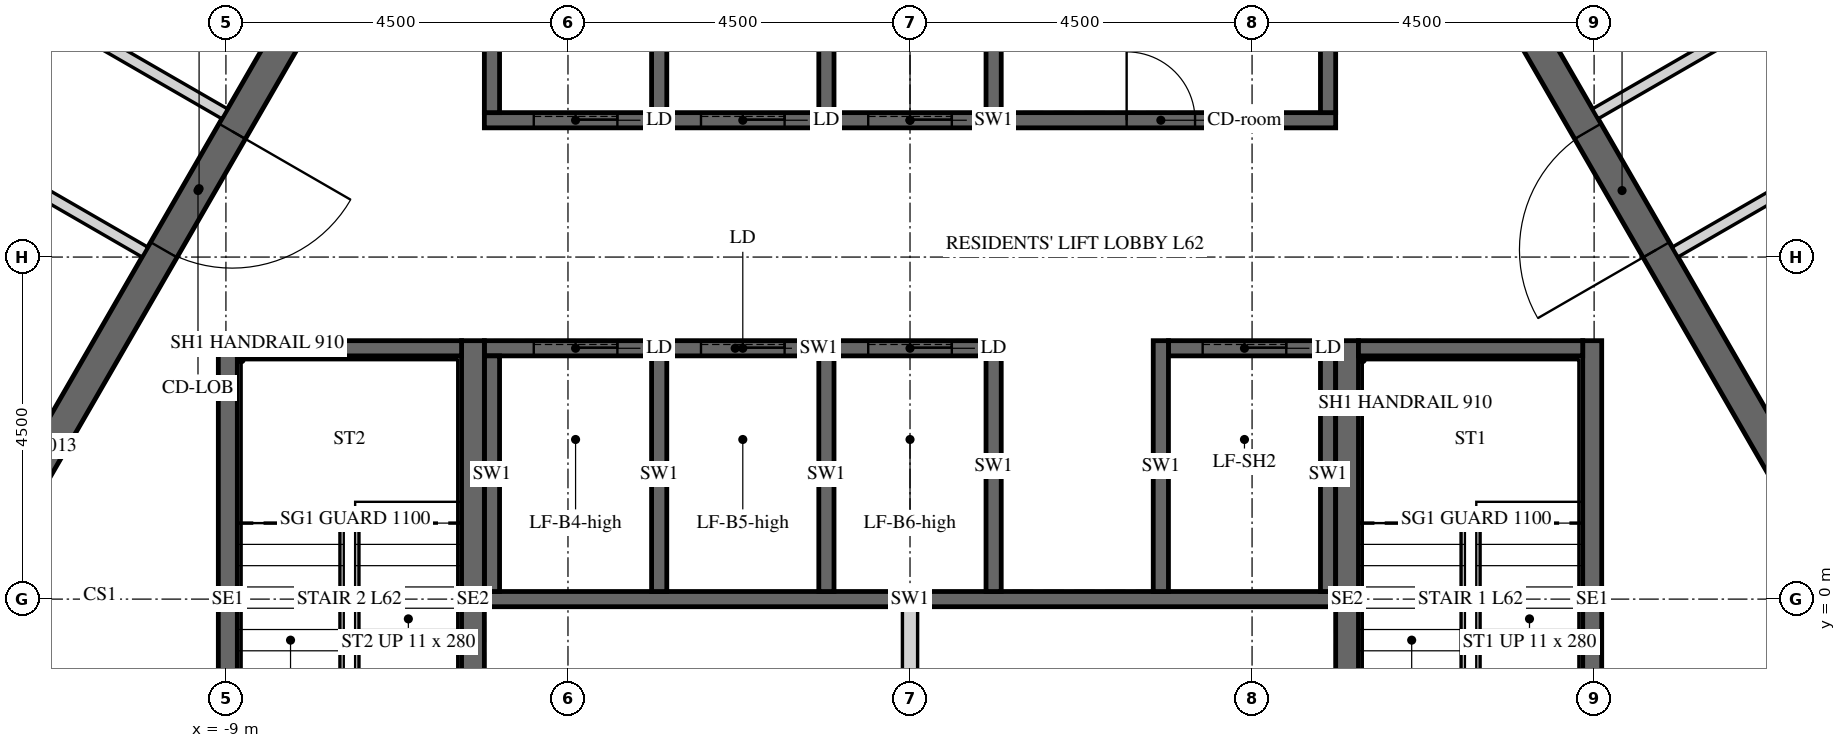
"""IFC4 building model, lengths in metres.
Left out: names, types, materials, properties, quantities, classifications, styles, units other than length and angle.
Written with IfcOpenShell. Run it as: python <this file> out.ifc"""

import sys

from ifc_helpers import new_model, si_unit, direction, frame, frame_2d, origin, place, context, subcontext, project, spatial, polyline, rectangle, outline, extrude, element, fill, save


model = new_model("IFC4")
c1 = context("Model", 3, precision=1e-05, world=origin(), true_north=direction((0.0, 1.0)))
c2 = subcontext(c1, "Body", "Model", "MODEL_VIEW")
j1 = project(units=[si_unit("LENGTHUNIT", "METRE"), si_unit("PLANEANGLEUNIT", "RADIAN")], contexts=[c1])
p1 = place(None, origin())
s1 = spatial("IfcSite", under=j1, at=p1, CompositionType="ELEMENT")
p2 = place(p1, origin())
s2 = spatial("IfcBuilding", under=s1, at=p2, CompositionType="ELEMENT")
p3 = place(p2, frame((0.0, 0.0, 260.1)))
s3 = spatial("IfcBuildingStorey", under=s2, at=p3, CompositionType="ELEMENT", Elevation=260.1)
p4 = place(p3, frame((-6.235, 10.8, -0.15), z_axis=(0.0, 0.0, 1.0), x_axis=(-0.499996419489, -0.866027470984, 0.0)))
e1 = element("IfcWall", 1, at=p4, inside=s3, PredefinedType="SHEAR", context=c2, shape_type="SweptSolid", body=[
    extrude(outline(polyline([(-0.115, -0.2), (12.586, -0.2), (12.355, 0.2), (0.115, 0.2), (-0.115, -0.2)])), origin(), (0.0, 0.0, 1.0), 3.9),
])
p5 = place(p4, frame((5.364, 0.0, 0.15)))
e2 = element("IfcOpeningElement", 2, at=p5, cuts=e1, PredefinedType="OPENING", context=c2, shape_type="SweptSolid", body=[
    extrude(rectangle(XDim=1.8, YDim=2.4, at=frame_2d((0.9, 1.2))), frame((0.0, 0.21, 0.0), z_axis=(0.0, -1.0, 0.0), x_axis=(1.0, 0.0, 0.0)), (0.0, 0.0, 1.0), 0.42),
])
p6 = place(p3, frame((-12.471, 0.0, -0.15), z_axis=(0.0, 0.0, 1.0), x_axis=(0.499996419489, -0.866027470984, 0.0)))
e3 = element("IfcWall", 3, at=p6, inside=s3, PredefinedType="SHEAR", context=c2, shape_type="SweptSolid", body=[
    extrude(outline(polyline([(-0.115, -0.2), (12.586, -0.2), (12.355, 0.2), (0.115, 0.2), (-0.115, -0.2)])), origin(), (0.0, 0.0, 1.0), 3.9),
])
p7 = place(p6, frame((5.306, 0.0, 0.15)))
e4 = element("IfcOpeningElement", 4, at=p7, cuts=e3, PredefinedType="OPENING", context=c2, shape_type="SweptSolid", body=[
    extrude(rectangle(XDim=1.8, YDim=2.4, at=frame_2d((0.9, 1.2))), frame((0.0, 0.21, 0.0), z_axis=(0.0, -1.0, 0.0), x_axis=(1.0, 0.0, 0.0)), (0.0, 0.0, 1.0), 0.42),
])
p8 = place(p3, frame((6.235, -10.8, -0.15), z_axis=(0.0, 0.0, 1.0), x_axis=(0.499996419489, 0.866027470984, 0.0)))
e5 = element("IfcWall", 5, at=p8, inside=s3, PredefinedType="SHEAR", context=c2, shape_type="SweptSolid", body=[
    extrude(outline(polyline([(-0.115, -0.2), (12.586, -0.2), (12.355, 0.2), (0.115, 0.2), (-0.115, -0.2)])), origin(), (0.0, 0.0, 1.0), 3.9),
])
p9 = place(p8, frame((5.364, 0.0, 0.15)))
e6 = element("IfcOpeningElement", 6, at=p9, cuts=e5, PredefinedType="OPENING", context=c2, shape_type="SweptSolid", body=[
    extrude(rectangle(XDim=1.8, YDim=2.4, at=frame_2d((0.9, 1.2))), frame((0.0, 0.21, 0.0), z_axis=(0.0, -1.0, 0.0), x_axis=(1.0, 0.0, 0.0)), (0.0, 0.0, 1.0), 0.42),
])
p10 = place(p3, frame((12.471, 0.0, -0.15), z_axis=(0.0, 0.0, 1.0), x_axis=(-0.499996419489, 0.866027470984, 0.0)))
e7 = element("IfcWall", 7, at=p10, inside=s3, PredefinedType="SHEAR", context=c2, shape_type="SweptSolid", body=[
    extrude(outline(polyline([(-0.115, -0.2), (12.586, -0.2), (12.355, 0.2), (0.115, 0.2), (-0.115, -0.2)])), origin(), (0.0, 0.0, 1.0), 3.9),
])
p11 = place(p10, frame((5.306, 0.0, 0.15)))
e8 = element("IfcOpeningElement", 8, at=p11, cuts=e7, PredefinedType="OPENING", context=c2, shape_type="SweptSolid", body=[
    extrude(rectangle(XDim=1.8, YDim=2.4, at=frame_2d((0.9, 1.2))), frame((0.0, 0.21, 0.0), z_axis=(0.0, -1.0, 0.0), x_axis=(1.0, 0.0, 0.0)), (0.0, 0.0, 1.0), 0.42),
])
p12 = place(p3, frame((-5.6, 6.3, -0.25), z_axis=(0.0, 0.0, 1.0), x_axis=(1.0, 0.0, 0.0)))
e9 = element("IfcWall", 9, at=p12, inside=s3, PredefinedType="SHEAR", context=c2, shape_type="SweptSolid", body=[
    extrude(rectangle(XDim=11.2, YDim=0.2, at=frame_2d((5.6, 0.0))), origin(), (0.0, 0.0, 1.0), 3.9),
])
p13 = place(p12, frame((8.45, 0.0, 0.25)))
e10 = element("IfcOpeningElement", 10, at=p13, cuts=e9, PredefinedType="OPENING", context=c2, shape_type="SweptSolid", body=[
    extrude(rectangle(XDim=0.9, YDim=2.1, at=frame_2d((0.45, 1.05))), frame((0.0, 0.11, 0.0), z_axis=(0.0, -1.0, 0.0), x_axis=(1.0, 0.0, 0.0)), (0.0, 0.0, 1.0), 0.22),
])
p14 = place(p12, frame((0.65, 0.0, 0.25)))
e11 = element("IfcOpeningElement", 11, at=p14, cuts=e9, PredefinedType="OPENING", context=c2, shape_type="SweptSolid", body=[
    extrude(rectangle(XDim=1.1, YDim=2.1, at=frame_2d((0.55, 1.05))), frame((0.0, 0.11, 0.0), z_axis=(0.0, -1.0, 0.0), x_axis=(1.0, 0.0, 0.0)), (0.0, 0.0, 1.0), 0.22),
])
p15 = place(p12, frame((2.85, 0.0, 0.25)))
e12 = element("IfcOpeningElement", 12, at=p15, cuts=e9, PredefinedType="OPENING", context=c2, shape_type="SweptSolid", body=[
    extrude(rectangle(XDim=1.1, YDim=2.1, at=frame_2d((0.55, 1.05))), frame((0.0, 0.11, 0.0), z_axis=(0.0, -1.0, 0.0), x_axis=(1.0, 0.0, 0.0)), (0.0, 0.0, 1.0), 0.22),
])
p16 = place(p12, frame((5.05, 0.0, 0.25)))
e13 = element("IfcOpeningElement", 13, at=p16, cuts=e9, PredefinedType="OPENING", context=c2, shape_type="SweptSolid", body=[
    extrude(rectangle(XDim=1.1, YDim=2.1, at=frame_2d((0.55, 1.05))), frame((0.0, 0.11, 0.0), z_axis=(0.0, -1.0, 0.0), x_axis=(1.0, 0.0, 0.0)), (0.0, 0.0, 1.0), 0.22),
])
for number, where, z_axis, x_axis in (
    (14, (-5.5, 6.4, -0.25), (0.0, 0.0, 1.0), (0.0, 1.0, 0.0)),
    (15, (-3.3, 6.4, -0.25), (0.0, 0.0, 1.0), (0.0, 1.0, 0.0)),
    (16, (-1.1, 6.4, -0.25), (0.0, 0.0, 1.0), (0.0, 1.0, 0.0)),
    (17, (1.1, 6.4, -0.25), (0.0, 0.0, 1.0), (0.0, 1.0, 0.0)),
    (18, (5.5, 6.4, -0.25), (0.0, 0.0, 1.0), (0.0, 1.0, 0.0)),
):
    element("IfcWall", number, at=place(p3, frame(where, z_axis=z_axis, x_axis=x_axis)), inside=s3, PredefinedType="SHEAR", context=c2, shape_type="SweptSolid", body=[
        extrude(rectangle(XDim=2.9, YDim=0.2, at=frame_2d((1.45, 0.0))), origin(), (0.0, 0.0, 1.0), 3.9),
    ])
p17 = place(p3, frame((-5.6, 3.3, -0.25), z_axis=(0.0, 0.0, 1.0), x_axis=(1.0, 0.0, 0.0)))
e19 = element("IfcWall", 19, at=p17, inside=s3, PredefinedType="SHEAR", context=c2, shape_type="SweptSolid", body=[
    extrude(rectangle(XDim=6.6, YDim=0.2, at=frame_2d((3.3, 0.0))), origin(), (0.0, 0.0, 1.0), 3.9),
])
p18 = place(p17, frame((0.65, 0.0, 0.25)))
e20 = element("IfcOpeningElement", 20, at=p18, cuts=e19, PredefinedType="OPENING", context=c2, shape_type="SweptSolid", body=[
    extrude(rectangle(XDim=1.1, YDim=2.1, at=frame_2d((0.55, 1.05))), frame((0.0, 0.11, 0.0), z_axis=(0.0, -1.0, 0.0), x_axis=(1.0, 0.0, 0.0)), (0.0, 0.0, 1.0), 0.22),
])
p19 = place(p17, frame((2.85, 0.0, 0.25)))
e21 = element("IfcOpeningElement", 21, at=p19, cuts=e19, PredefinedType="OPENING", context=c2, shape_type="SweptSolid", body=[
    extrude(rectangle(XDim=1.1, YDim=2.1, at=frame_2d((0.55, 1.05))), frame((0.0, 0.11, 0.0), z_axis=(0.0, -1.0, 0.0), x_axis=(1.0, 0.0, 0.0)), (0.0, 0.0, 1.0), 0.22),
])
p20 = place(p17, frame((5.05, 0.0, 0.25)))
e22 = element("IfcOpeningElement", 22, at=p20, cuts=e19, PredefinedType="OPENING", context=c2, shape_type="SweptSolid", body=[
    extrude(rectangle(XDim=1.1, YDim=2.1, at=frame_2d((0.55, 1.05))), frame((0.0, 0.11, 0.0), z_axis=(0.0, -1.0, 0.0), x_axis=(1.0, 0.0, 0.0)), (0.0, 0.0, 1.0), 0.22),
])
p21 = place(p3, frame((3.4, 3.3, -0.25), z_axis=(0.0, 0.0, 1.0), x_axis=(1.0, 0.0, 0.0)))
e23 = element("IfcWall", 23, at=p21, inside=s3, PredefinedType="SHEAR", context=c2, shape_type="SweptSolid", body=[
    extrude(rectangle(XDim=2.2, YDim=0.2, at=frame_2d((1.1, 0.0))), origin(), (0.0, 0.0, 1.0), 3.9),
])
p22 = place(p21, frame((0.45, 0.0, 0.25)))
e24 = element("IfcOpeningElement", 24, at=p22, cuts=e23, PredefinedType="OPENING", context=c2, shape_type="SweptSolid", body=[
    extrude(rectangle(XDim=1.1, YDim=2.1, at=frame_2d((0.55, 1.05))), frame((0.0, 0.11, 0.0), z_axis=(0.0, -1.0, 0.0), x_axis=(1.0, 0.0, 0.0)), (0.0, 0.0, 1.0), 0.22),
])
p23 = place(p3, frame((-5.6, 0.0, -0.25), z_axis=(0.0, 0.0, 1.0), x_axis=(1.0, 0.0, 0.0)))
e25 = element("IfcWall", 25, at=p23, inside=s3, PredefinedType="SHEAR", context=c2, shape_type="SweptSolid", body=[
    extrude(rectangle(XDim=11.2, YDim=0.2, at=frame_2d((5.6, 0.0))), origin(), (0.0, 0.0, 1.0), 3.9),
])
for number, where, z_axis, x_axis in (
    (26, (-5.5, 0.1, -0.25), (0.0, 0.0, 1.0), (0.0, 1.0, 0.0)),
    (27, (-3.3, 0.1, -0.25), (0.0, 0.0, 1.0), (0.0, 1.0, 0.0)),
    (28, (-1.1, 0.1, -0.25), (0.0, 0.0, 1.0), (0.0, 1.0, 0.0)),
):
    element("IfcWall", number, at=place(p3, frame(where, z_axis=z_axis, x_axis=x_axis)), inside=s3, PredefinedType="SHEAR", context=c2, shape_type="SweptSolid", body=[
        extrude(rectangle(XDim=3.1, YDim=0.2, at=frame_2d((1.55, 0.0))), origin(), (0.0, 0.0, 1.0), 3.9),
    ])
for number, where, z_axis, x_axis in (
    (29, (1.1, 0.1, -0.25), (0.0, 0.0, 1.0), (0.0, 1.0, 0.0)),
    (30, (3.3, 0.1, -0.25), (0.0, 0.0, 1.0), (0.0, 1.0, 0.0)),
):
    element("IfcWall", number, at=place(p3, frame(where, z_axis=z_axis, x_axis=x_axis)), inside=s3, PredefinedType="SHEAR", context=c2, shape_type="SweptSolid", body=[
        extrude(rectangle(XDim=3.3, YDim=0.2, at=frame_2d((1.65, 0.0))), origin(), (0.0, 0.0, 1.0), 3.9),
    ])
p24 = place(p3, frame((5.5, 0.1, -0.25), z_axis=(0.0, 0.0, 1.0), x_axis=(0.0, 1.0, 0.0)))
e31 = element("IfcWall", 31, at=p24, inside=s3, PredefinedType="SHEAR", context=c2, shape_type="SweptSolid", body=[
    extrude(rectangle(XDim=3.1, YDim=0.2, at=frame_2d((1.55, 0.0))), origin(), (0.0, 0.0, 1.0), 3.9),
])
p25 = place(p3, frame((0.0, -6.2, 0.0), z_axis=(0.0, 0.0, 1.0), x_axis=(0.0, 1.0, 0.0)))
e32 = element("IfcWall", 32, at=p25, inside=s3, PredefinedType="PARTITIONING", context=c2, shape_type="SweptSolid", body=[
    extrude(rectangle(XDim=6.1, YDim=0.2, at=frame_2d((3.05, 0.0))), origin(), (0.0, 0.0, 1.0), 3.65),
])
p26 = place(p3, frame((5.75, -3.4, -0.25), z_axis=(0.0, 0.0, 1.0), x_axis=(0.0, 1.0, 0.0)))
e33 = element("IfcWall", 33, at=p26, inside=s3, PredefinedType="SHEAR", context=c2, shape_type="SweptSolid", body=[
    extrude(rectangle(XDim=6.8, YDim=0.3, at=frame_2d((3.4, 0.0))), origin(), (0.0, 0.0, 1.0), 3.9),
])
p27 = place(p3, frame((8.975, -3.4, -0.25), z_axis=(0.0, 0.0, 1.0), x_axis=(0.0, 1.0, 0.0)))
e34 = element("IfcWall", 34, at=p27, inside=s3, PredefinedType="SHEAR", context=c2, shape_type="SweptSolid", body=[
    extrude(rectangle(XDim=6.8, YDim=0.25, at=frame_2d((3.4, 0.0))), origin(), (0.0, 0.0, 1.0), 3.9),
])
p28 = place(p3, frame((5.9, 3.3, -0.25), z_axis=(0.0, 0.0, 1.0), x_axis=(1.0, 0.0, 0.0)))
e35 = element("IfcWall", 35, at=p28, inside=s3, PredefinedType="SHEAR", context=c2, shape_type="SweptSolid", body=[
    extrude(rectangle(XDim=2.95, YDim=0.2, at=frame_2d((1.475, 0.0))), origin(), (0.0, 0.0, 1.0), 3.9),
])
p29 = place(p3, frame((-5.75, -3.4, -0.25), z_axis=(0.0, 0.0, 1.0), x_axis=(0.0, 1.0, 0.0)))
e36 = element("IfcWall", 36, at=p29, inside=s3, PredefinedType="SHEAR", context=c2, shape_type="SweptSolid", body=[
    extrude(rectangle(XDim=6.8, YDim=0.3, at=frame_2d((3.4, 0.0))), origin(), (0.0, 0.0, 1.0), 3.9),
])
p30 = place(p3, frame((-8.975, -3.4, -0.25), z_axis=(0.0, 0.0, 1.0), x_axis=(0.0, 1.0, 0.0)))
e37 = element("IfcWall", 37, at=p30, inside=s3, PredefinedType="SHEAR", context=c2, shape_type="SweptSolid", body=[
    extrude(rectangle(XDim=6.8, YDim=0.25, at=frame_2d((3.4, 0.0))), origin(), (0.0, 0.0, 1.0), 3.9),
])
p31 = place(p3, frame((-8.85, 3.3, -0.25), z_axis=(0.0, 0.0, 1.0), x_axis=(1.0, 0.0, 0.0)))
e38 = element("IfcWall", 38, at=p31, inside=s3, PredefinedType="SHEAR", context=c2, shape_type="SweptSolid", body=[
    extrude(rectangle(XDim=2.95, YDim=0.2, at=frame_2d((1.475, 0.0))), origin(), (0.0, 0.0, 1.0), 3.9),
])
p32 = place(p3, frame((-8.622, 17.225, 0.0), z_axis=(0.0, 0.0, 1.0), x_axis=(-0.438366544921, -0.898796290765, 0.0)))
e39 = element("IfcWall", 39, at=p32, inside=s3, PredefinedType="PARTITIONING", context=c2, shape_type="SweptSolid", body=[
    extrude(rectangle(XDim=17.273, YDim=0.15, at=frame_2d((8.637, 0.0))), origin(), (0.0, 0.0, 1.0), 2.823),
])
p33 = place(p32, frame((6.478, 0.0, 0.0)))
e40 = element("IfcOpeningElement", 40, at=p33, cuts=e39, PredefinedType="OPENING", context=c2, shape_type="SweptSolid", body=[
    extrude(rectangle(XDim=1.0, YDim=2.1, at=frame_2d((0.5, 1.05))), frame((0.0, 0.085, 0.0), z_axis=(0.0, -1.0, 0.0), x_axis=(1.0, 0.0, 0.0)), (0.0, 0.0, 1.0), 0.17),
])
p34 = place(p3, frame((-9.016, 6.384, 0.0), z_axis=(0.0, 0.0, 1.0), x_axis=(-0.866010648346, 0.500025556299, 0.0)))
e41 = element("IfcWall", 41, at=p34, inside=s3, PredefinedType="PARTITIONING", context=c2, shape_type="SweptSolid", body=[
    extrude(rectangle(XDim=2.905, YDim=0.15, at=frame_2d((1.453, 0.0))), origin(), (0.0, 0.0, 1.0), 2.823),
])
p35 = place(p3, frame((-12.389, 5.907, 0.0), z_axis=(0.0, 0.0, 1.0), x_axis=(0.866034066097, -0.499984996134, 0.0)))
e42 = element("IfcWall", 42, at=p35, inside=s3, PredefinedType="PARTITIONING", context=c2, shape_type="SweptSolid", body=[
    extrude(rectangle(XDim=2.683, YDim=0.15, at=frame_2d((1.342, 0.0))), origin(), (0.0, 0.0, 1.0), 2.823),
])
p36 = place(p3, frame((19.228, -1.146, 0.0), z_axis=(0.0, 0.0, 1.0), x_axis=(-0.559190017735, 0.829039519001, 0.0)))
e43 = element("IfcWall", 43, at=p36, inside=s3, PredefinedType="PARTITIONING", context=c2, shape_type="SweptSolid", body=[
    extrude(rectangle(XDim=17.273, YDim=0.15, at=frame_2d((8.637, 0.0))), origin(), (0.0, 0.0, 1.0), 2.823),
])
p37 = place(p36, frame((6.478, 0.0, 0.0)))
e44 = element("IfcOpeningElement", 44, at=p37, cuts=e43, PredefinedType="OPENING", context=c2, shape_type="SweptSolid", body=[
    extrude(rectangle(XDim=1.0, YDim=2.1, at=frame_2d((0.5, 1.05))), frame((0.0, 0.085, 0.0), z_axis=(0.0, -1.0, 0.0), x_axis=(1.0, 0.0, 0.0)), (0.0, 0.0, 1.0), 0.17),
])
p38 = place(p3, frame((10.066, 4.566, 0.0), z_axis=(0.0, 0.0, 1.0), x_axis=(0.866034661658, 0.49998396455, 0.0)))
e45 = element("IfcWall", 45, at=p38, inside=s3, PredefinedType="PARTITIONING", context=c2, shape_type="SweptSolid", body=[
    extrude(rectangle(XDim=2.909, YDim=0.15, at=frame_2d((1.455, 0.0))), origin(), (0.0, 0.0, 1.0), 2.823),
])
p39 = place(p3, frame((11.343, 7.728, 0.0), z_axis=(0.0, 0.0, 1.0), x_axis=(-0.866037314867, -0.499979368833, 0.0)))
e46 = element("IfcWall", 46, at=p39, inside=s3, PredefinedType="PARTITIONING", context=c2, shape_type="SweptSolid", body=[
    extrude(rectangle(XDim=2.687, YDim=0.15, at=frame_2d((1.344, 0.0))), origin(), (0.0, 0.0, 1.0), 2.823),
])
p40 = place(p5, origin())
e47 = element("IfcDoor", 47, at=p40, inside=s3, OperationType="DOUBLE_DOOR_SINGLE_SWING", PredefinedType="DOOR", context=c2, shape_type="SweptSolid", body=[
    extrude(rectangle(XDim=1.8, YDim=2.4, at=frame_2d((0.9, 1.2))), frame((0.0, 0.025, 0.0), z_axis=(0.0, -1.0, 0.0), x_axis=(1.0, 0.0, 0.0)), (0.0, 0.0, 1.0), 0.05),
])
fill(e2, e47)
p41 = place(p11, origin())
e48 = element("IfcDoor", 48, at=p41, inside=s3, OperationType="DOUBLE_DOOR_SINGLE_SWING", PredefinedType="DOOR", context=c2, shape_type="SweptSolid", body=[
    extrude(rectangle(XDim=1.8, YDim=2.4, at=frame_2d((0.9, 1.2))), frame((0.0, 0.025, 0.0), z_axis=(0.0, -1.0, 0.0), x_axis=(1.0, 0.0, 0.0)), (0.0, 0.0, 1.0), 0.05),
])
fill(e8, e48)
p42 = place(p13, origin())
e49 = element("IfcDoor", 49, at=p42, inside=s3, OperationType="SINGLE_SWING_LEFT", PredefinedType="DOOR", context=c2, shape_type="SweptSolid", body=[
    extrude(rectangle(XDim=0.9, YDim=2.1, at=frame_2d((0.45, 1.05))), frame((0.0, 0.025, 0.0), z_axis=(0.0, -1.0, 0.0), x_axis=(1.0, 0.0, 0.0)), (0.0, 0.0, 1.0), 0.05),
])
fill(e10, e49)
p43 = place(p14, origin())
e50 = element("IfcDoor", 50, at=p43, inside=s3, OperationType="SLIDING_TO_LEFT", PredefinedType="DOOR", context=c2, shape_type="SweptSolid", body=[
    extrude(rectangle(XDim=1.1, YDim=2.1, at=frame_2d((0.55, 1.05))), frame((0.0, 0.025, 0.0), z_axis=(0.0, -1.0, 0.0), x_axis=(1.0, 0.0, 0.0)), (0.0, 0.0, 1.0), 0.05),
])
fill(e11, e50)
p44 = place(p15, origin())
e51 = element("IfcDoor", 51, at=p44, inside=s3, OperationType="SLIDING_TO_LEFT", PredefinedType="DOOR", context=c2, shape_type="SweptSolid", body=[
    extrude(rectangle(XDim=1.1, YDim=2.1, at=frame_2d((0.55, 1.05))), frame((0.0, 0.025, 0.0), z_axis=(0.0, -1.0, 0.0), x_axis=(1.0, 0.0, 0.0)), (0.0, 0.0, 1.0), 0.05),
])
fill(e12, e51)
p45 = place(p16, origin())
e52 = element("IfcDoor", 52, at=p45, inside=s3, OperationType="SLIDING_TO_LEFT", PredefinedType="DOOR", context=c2, shape_type="SweptSolid", body=[
    extrude(rectangle(XDim=1.1, YDim=2.1, at=frame_2d((0.55, 1.05))), frame((0.0, 0.025, 0.0), z_axis=(0.0, -1.0, 0.0), x_axis=(1.0, 0.0, 0.0)), (0.0, 0.0, 1.0), 0.05),
])
fill(e13, e52)
p46 = place(p18, origin())
e53 = element("IfcDoor", 53, at=p46, inside=s3, OperationType="SLIDING_TO_LEFT", PredefinedType="DOOR", context=c2, shape_type="SweptSolid", body=[
    extrude(rectangle(XDim=1.1, YDim=2.1, at=frame_2d((0.55, 1.05))), frame((0.0, 0.025, 0.0), z_axis=(0.0, -1.0, 0.0), x_axis=(1.0, 0.0, 0.0)), (0.0, 0.0, 1.0), 0.05),
])
fill(e20, e53)
p47 = place(p19, origin())
e54 = element("IfcDoor", 54, at=p47, inside=s3, OperationType="SLIDING_TO_LEFT", PredefinedType="DOOR", context=c2, shape_type="SweptSolid", body=[
    extrude(rectangle(XDim=1.1, YDim=2.1, at=frame_2d((0.55, 1.05))), frame((0.0, 0.025, 0.0), z_axis=(0.0, -1.0, 0.0), x_axis=(1.0, 0.0, 0.0)), (0.0, 0.0, 1.0), 0.05),
])
fill(e21, e54)
p48 = place(p20, origin())
e55 = element("IfcDoor", 55, at=p48, inside=s3, OperationType="SLIDING_TO_LEFT", PredefinedType="DOOR", context=c2, shape_type="SweptSolid", body=[
    extrude(rectangle(XDim=1.1, YDim=2.1, at=frame_2d((0.55, 1.05))), frame((0.0, 0.025, 0.0), z_axis=(0.0, -1.0, 0.0), x_axis=(1.0, 0.0, 0.0)), (0.0, 0.0, 1.0), 0.05),
])
fill(e22, e55)
p49 = place(p22, origin())
e56 = element("IfcDoor", 56, at=p49, inside=s3, OperationType="SLIDING_TO_LEFT", PredefinedType="DOOR", context=c2, shape_type="SweptSolid", body=[
    extrude(rectangle(XDim=1.1, YDim=2.1, at=frame_2d((0.55, 1.05))), frame((0.0, 0.025, 0.0), z_axis=(0.0, -1.0, 0.0), x_axis=(1.0, 0.0, 0.0)), (0.0, 0.0, 1.0), 0.05),
])
fill(e24, e56)
save(model, sys.argv[1])
